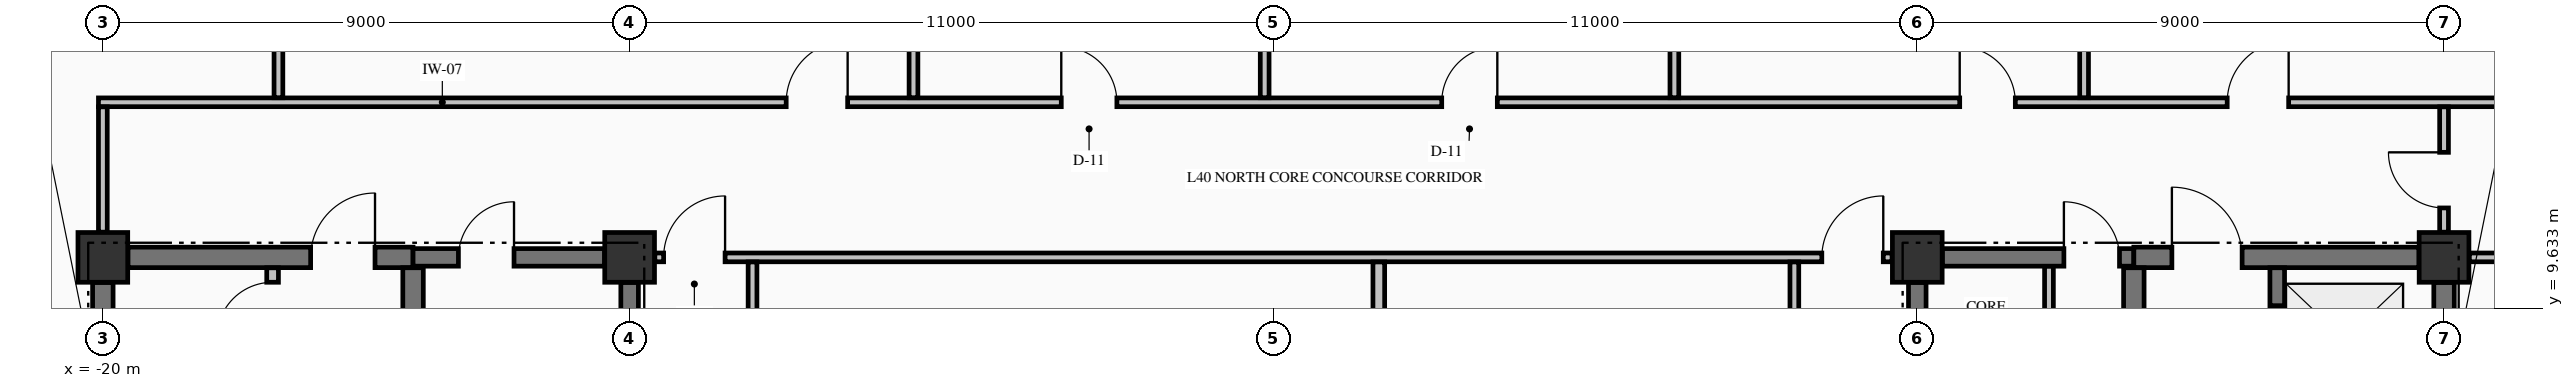
"""IFC4 building model, lengths in metres.
Left out: names, types, materials, properties, quantities, classifications, styles, units other than length and angle.
Written with IfcOpenShell. Run it as: python <this file> out.ifc"""

import sys

from ifc_helpers import new_model, si_unit, direction, frame, frame_2d, origin, origin_2d, place, context, subcontext, project, spatial, rectangle, extrude, element, fill, save


model = new_model("IFC4")
c1 = context("Model", 3, precision=1e-05, world=origin(), true_north=direction((0.0, 1.0)))
c2 = subcontext(c1, "Body", "Model", "MODEL_VIEW")
j1 = project(units=[si_unit("LENGTHUNIT", "METRE"), si_unit("PLANEANGLEUNIT", "RADIAN")], contexts=[c1])
p1 = place(None, origin())
s1 = spatial("IfcSite", under=j1, at=p1, CompositionType="ELEMENT")
p2 = place(p1, origin())
s2 = spatial("IfcBuilding", under=s1, at=p2, CompositionType="ELEMENT")
p3 = place(p2, frame((0.0, 0.0, 158.24)))
s3 = spatial("IfcBuildingStorey", under=s2, at=p3, CompositionType="ELEMENT", Elevation=158.24)
for number, where, z_axis, x_axis in (
    (1, (-20.0, 10.5, -0.425), (0.0, 0.0, 1.0), (1.0, 0.0, 0.0)),
    (2, (-11.0, 10.5, -0.425), (0.0, 0.0, 1.0), (1.0, 0.0, 0.0)),
    (3, (11.0, 10.5, -0.425), (0.0, 0.0, 1.0), (1.0, 0.0, 0.0)),
    (4, (20.0, 10.5, -0.425), (0.0, 0.0, 1.0), (1.0, 0.0, 0.0)),
):
    element("IfcColumn", number, at=place(p3, frame(where, z_axis=z_axis, x_axis=x_axis)), inside=s3, PredefinedType="COLUMN", context=c2, shape_type="SweptSolid", body=[
        extrude(rectangle(XDim=0.85, YDim=0.85, at=origin_2d()), origin(), (0.0, 0.0, 1.0), 4.595),
    ])
p4 = place(p3, frame((-19.571, 10.5, 0.0), z_axis=(0.0, 0.0, 1.0), x_axis=(1.0, 0.0, 0.0)))
e5 = element("IfcWall", 5, at=p4, inside=s3, PredefinedType="SHEAR", context=c2, shape_type="SweptSolid", body=[
    extrude(rectangle(XDim=4.871, YDim=0.35, at=frame_2d((2.436, 0.0))), origin(), (0.0, 0.0, 1.0), 4.17),
])
p5 = place(p4, frame((3.121, 0.0, 0.0)))
e6 = element("IfcOpeningElement", 6, at=p5, cuts=e5, PredefinedType="OPENING", context=c2, shape_type="SweptSolid", body=[
    extrude(rectangle(XDim=1.1, YDim=2.15, at=frame_2d((0.55, 1.075))), frame((0.0, 0.185, 0.0), z_axis=(0.0, -1.0, 0.0), x_axis=(1.0, 0.0, 0.0)), (0.0, 0.0, 1.0), 0.37),
])
p6 = place(p3, frame((-14.7, 10.5, 0.0), z_axis=(0.0, 0.0, 1.0), x_axis=(1.0, 0.0, 0.0)))
e7 = element("IfcWall", 7, at=p6, inside=s3, PredefinedType="SHEAR", context=c2, shape_type="SweptSolid", body=[
    extrude(rectangle(XDim=3.271, YDim=0.3, at=frame_2d((1.635, 0.0))), origin(), (0.0, 0.0, 1.0), 4.17),
])
p7 = place(p6, frame((0.775, 0.0, 0.0)))
e8 = element("IfcOpeningElement", 8, at=p7, cuts=e7, PredefinedType="OPENING", context=c2, shape_type="SweptSolid", body=[
    extrude(rectangle(XDim=0.95, YDim=2.15, at=frame_2d((0.475, 1.075))), frame((0.0, 0.16, 0.0), z_axis=(0.0, -1.0, 0.0), x_axis=(1.0, 0.0, 0.0)), (0.0, 0.0, 1.0), 0.32),
])
p8 = place(p3, frame((11.429, 10.5, 0.0), z_axis=(0.0, 0.0, 1.0), x_axis=(1.0, 0.0, 0.0)))
e9 = element("IfcWall", 9, at=p8, inside=s3, PredefinedType="SHEAR", context=c2, shape_type="SweptSolid", body=[
    extrude(rectangle(XDim=3.271, YDim=0.3, at=frame_2d((1.635, 0.0))), origin(), (0.0, 0.0, 1.0), 4.17),
])
p9 = place(p8, frame((2.076, 0.0, 0.0)))
e10 = element("IfcOpeningElement", 10, at=p9, cuts=e9, PredefinedType="OPENING", context=c2, shape_type="SweptSolid", body=[
    extrude(rectangle(XDim=0.95, YDim=2.15, at=frame_2d((0.475, 1.075))), frame((0.0, 0.16, 0.0), z_axis=(0.0, -1.0, 0.0), x_axis=(1.0, 0.0, 0.0)), (0.0, 0.0, 1.0), 0.32),
])
p10 = place(p3, frame((14.7, 10.5, 0.0), z_axis=(0.0, 0.0, 1.0), x_axis=(1.0, 0.0, 0.0)))
e11 = element("IfcWall", 11, at=p10, inside=s3, PredefinedType="SHEAR", context=c2, shape_type="SweptSolid", body=[
    extrude(rectangle(XDim=4.871, YDim=0.35, at=frame_2d((2.436, 0.0))), origin(), (0.0, 0.0, 1.0), 4.17),
])
p11 = place(p10, frame((0.65, 0.0, 0.0)))
e12 = element("IfcOpeningElement", 12, at=p11, cuts=e11, PredefinedType="OPENING", context=c2, shape_type="SweptSolid", body=[
    extrude(rectangle(XDim=1.2, YDim=2.15, at=frame_2d((0.6, 1.075))), frame((0.0, 0.185, 0.0), z_axis=(0.0, -1.0, 0.0), x_axis=(1.0, 0.0, 0.0)), (0.0, 0.0, 1.0), 0.37),
])
p12 = place(p3, frame((-10.569, 10.5, 0.0), z_axis=(0.0, 0.0, 1.0), x_axis=(1.0, 0.0, 0.0)))
e13 = element("IfcWall", 13, at=p12, inside=s3, PredefinedType="PARTITIONING", context=c2, shape_type="SweptSolid", body=[
    extrude(rectangle(XDim=21.138, YDim=0.15, at=frame_2d((10.569, 0.0))), origin(), (0.0, 0.0, 1.0), 4.17),
])
p13 = place(p12, frame((0.15, 0.0, 0.0)))
e14 = element("IfcOpeningElement", 14, at=p13, cuts=e13, PredefinedType="OPENING", context=c2, shape_type="SweptSolid", body=[
    extrude(rectangle(XDim=1.05, YDim=2.15, at=frame_2d((0.525, 1.075))), frame((0.0, 0.085, 0.0), z_axis=(0.0, -1.0, 0.0), x_axis=(1.0, 0.0, 0.0)), (0.0, 0.0, 1.0), 0.17),
])
p14 = place(p12, frame((19.938, 0.0, 0.0)))
e15 = element("IfcOpeningElement", 15, at=p14, cuts=e13, PredefinedType="OPENING", context=c2, shape_type="SweptSolid", body=[
    extrude(rectangle(XDim=1.05, YDim=2.15, at=frame_2d((0.525, 1.075))), frame((0.0, 0.085, 0.0), z_axis=(0.0, -1.0, 0.0), x_axis=(1.0, 0.0, 0.0)), (0.0, 0.0, 1.0), 0.17),
])
p15 = place(p3, frame((20.431, 10.5, 0.0), z_axis=(0.0, 0.0, 1.0), x_axis=(1.0, 0.0, 0.0)))
e16 = element("IfcWall", 16, at=p15, inside=s3, PredefinedType="PARTITIONING", context=c2, shape_type="SweptSolid", body=[
    extrude(rectangle(XDim=6.404, YDim=0.15, at=frame_2d((3.202, 0.0))), origin(), (0.0, 0.0, 1.0), 4.17),
])
p16 = place(p15, frame((2.594, 0.0, 0.0)))
e17 = element("IfcOpeningElement", 17, at=p16, cuts=e16, PredefinedType="OPENING", context=c2, shape_type="SweptSolid", body=[
    extrude(rectangle(XDim=0.95, YDim=2.15, at=frame_2d((0.475, 1.075))), frame((0.0, 0.085, 0.0), z_axis=(0.0, -1.0, 0.0), x_axis=(1.0, 0.0, 0.0)), (0.0, 0.0, 1.0), 0.17),
])
p17 = place(p3, frame((-20.075, 13.15, 0.0), z_axis=(0.0, 0.0, 1.0), x_axis=(1.0, 0.0, 0.0)))
e18 = element("IfcWall", 18, at=p17, inside=s3, PredefinedType="PARTITIONING", context=c2, shape_type="SweptSolid", body=[
    extrude(rectangle(XDim=46.91, YDim=0.15, at=frame_2d((23.455, 0.0))), origin(), (0.0, 0.0, 1.0), 4.17),
])
p18 = place(p17, frame((11.75, 0.0, 0.0)))
e19 = element("IfcOpeningElement", 19, at=p18, cuts=e18, PredefinedType="OPENING", context=c2, shape_type="SweptSolid", body=[
    extrude(rectangle(XDim=1.05, YDim=2.15, at=frame_2d((0.525, 1.075))), frame((0.0, 0.085, 0.0), z_axis=(0.0, -1.0, 0.0), x_axis=(1.0, 0.0, 0.0)), (0.0, 0.0, 1.0), 0.17),
])
p19 = place(p17, frame((16.45, 0.0, 0.0)))
e20 = element("IfcOpeningElement", 20, at=p19, cuts=e18, PredefinedType="OPENING", context=c2, shape_type="SweptSolid", body=[
    extrude(rectangle(XDim=0.95, YDim=2.15, at=frame_2d((0.475, 1.075))), frame((0.0, 0.085, 0.0), z_axis=(0.0, -1.0, 0.0), x_axis=(1.0, 0.0, 0.0)), (0.0, 0.0, 1.0), 0.17),
])
p20 = place(p17, frame((22.95, 0.0, 0.0)))
e21 = element("IfcOpeningElement", 21, at=p20, cuts=e18, PredefinedType="OPENING", context=c2, shape_type="SweptSolid", body=[
    extrude(rectangle(XDim=0.95, YDim=2.15, at=frame_2d((0.475, 1.075))), frame((0.0, 0.085, 0.0), z_axis=(0.0, -1.0, 0.0), x_axis=(1.0, 0.0, 0.0)), (0.0, 0.0, 1.0), 0.17),
])
p21 = place(p17, frame((31.8, 0.0, 0.0)))
e22 = element("IfcOpeningElement", 22, at=p21, cuts=e18, PredefinedType="OPENING", context=c2, shape_type="SweptSolid", body=[
    extrude(rectangle(XDim=0.95, YDim=2.15, at=frame_2d((0.475, 1.075))), frame((0.0, 0.085, 0.0), z_axis=(0.0, -1.0, 0.0), x_axis=(1.0, 0.0, 0.0)), (0.0, 0.0, 1.0), 0.17),
])
p22 = place(p17, frame((36.37, 0.0, 0.0)))
e23 = element("IfcOpeningElement", 23, at=p22, cuts=e18, PredefinedType="OPENING", context=c2, shape_type="SweptSolid", body=[
    extrude(rectangle(XDim=1.05, YDim=2.15, at=frame_2d((0.525, 1.075))), frame((0.0, 0.085, 0.0), z_axis=(0.0, -1.0, 0.0), x_axis=(1.0, 0.0, 0.0)), (0.0, 0.0, 1.0), 0.17),
])
p23 = place(p3, frame((-20.0, 5.327, 0.0), z_axis=(0.0, 0.0, 1.0), x_axis=(0.0, 1.0, 0.0)))
e24 = element("IfcWall", 24, at=p23, inside=s3, PredefinedType="SHEAR", context=c2, shape_type="SweptSolid", body=[
    extrude(rectangle(XDim=4.744, YDim=0.35, at=frame_2d((2.372, 0.0))), origin(), (0.0, 0.0, 1.0), 4.17),
])
p24 = place(p3, frame((-14.7, 5.852, 0.0), z_axis=(0.0, 0.0, 1.0), x_axis=(0.0, 1.0, 0.0)))
e25 = element("IfcWall", 25, at=p24, inside=s3, PredefinedType="SHEAR", context=c2, shape_type="SweptSolid", body=[
    extrude(rectangle(XDim=4.471, YDim=0.35, at=frame_2d((2.235, 0.0))), origin(), (0.0, 0.0, 1.0), 4.17),
])
for number, where, z_axis, x_axis in (
    (26, (-11.0, 5.852, 0.0), (0.0, 0.0, 1.0), (0.0, 1.0, 0.0)),
    (27, (11.0, 5.852, 0.0), (0.0, 0.0, 1.0), (0.0, 1.0, 0.0)),
):
    element("IfcWall", number, at=place(p3, frame(where, z_axis=z_axis, x_axis=x_axis)), inside=s3, PredefinedType="SHEAR", context=c2, shape_type="SweptSolid", body=[
        extrude(rectangle(XDim=4.219, YDim=0.3, at=frame_2d((2.109, 0.0))), origin(), (0.0, 0.0, 1.0), 4.17),
    ])
p25 = place(p3, frame((14.7, 5.852, 0.0), z_axis=(0.0, 0.0, 1.0), x_axis=(0.0, 1.0, 0.0)))
e28 = element("IfcWall", 28, at=p25, inside=s3, PredefinedType="SHEAR", context=c2, shape_type="SweptSolid", body=[
    extrude(rectangle(XDim=4.471, YDim=0.35, at=frame_2d((2.235, 0.0))), origin(), (0.0, 0.0, 1.0), 4.17),
])
p26 = place(p3, frame((17.15, 7.877, 0.0), z_axis=(0.0, 0.0, 1.0), x_axis=(0.0, 1.0, 0.0)))
e29 = element("IfcWall", 29, at=p26, inside=s3, PredefinedType="SOLIDWALL", context=c2, shape_type="SweptSolid", body=[
    extrude(rectangle(XDim=2.446, YDim=0.25, at=frame_2d((1.223, 0.0))), origin(), (0.0, 0.0, 1.0), 4.17),
])
p27 = place(p26, frame((0.698, 0.0, 0.0)))
e30 = element("IfcOpeningElement", 30, at=p27, cuts=e29, PredefinedType="OPENING", context=c2, shape_type="SweptSolid", body=[
    extrude(rectangle(XDim=1.1, YDim=2.2, at=frame_2d((0.55, 1.1))), frame((0.0, 0.135, 0.0), z_axis=(0.0, -1.0, 0.0), x_axis=(1.0, 0.0, 0.0)), (0.0, 0.0, 1.0), 0.27),
])
p28 = place(p3, frame((20.0, 7.877, 0.0), z_axis=(0.0, 0.0, 1.0), x_axis=(0.0, 1.0, 0.0)))
e31 = element("IfcWall", 31, at=p28, inside=s3, PredefinedType="SHEAR", context=c2, shape_type="SweptSolid", body=[
    extrude(rectangle(XDim=2.194, YDim=0.35, at=frame_2d((1.097, 0.0))), origin(), (0.0, 0.0, 1.0), 4.17),
])
p29 = place(p3, frame((-20.0, 10.931, 0.0), z_axis=(0.0, 0.0, 1.0), x_axis=(0.0, 1.0, 0.0)))
e32 = element("IfcWall", 32, at=p29, inside=s3, PredefinedType="PARTITIONING", context=c2, shape_type="SweptSolid", body=[
    extrude(rectangle(XDim=2.141, YDim=0.15, at=frame_2d((1.071, 0.0))), origin(), (0.0, 0.0, 1.0), 3.36),
])
p30 = place(p3, frame((-17.1, 8.778, 0.0), z_axis=(0.0, 0.0, 1.0), x_axis=(0.0, 1.0, 0.0)))
e33 = element("IfcWall", 33, at=p30, inside=s3, PredefinedType="PARTITIONING", context=c2, shape_type="SweptSolid", body=[
    extrude(rectangle(XDim=1.544, YDim=0.2, at=frame_2d((0.772, 0.0))), origin(), (0.0, 0.0, 1.0), 4.17),
])
p31 = place(p30, frame((0.347, 0.0, 0.0)))
e34 = element("IfcOpeningElement", 34, at=p31, cuts=e33, PredefinedType="OPENING", context=c2, shape_type="SweptSolid", body=[
    extrude(rectangle(XDim=0.95, YDim=2.15, at=frame_2d((0.475, 1.075))), frame((0.0, 0.11, 0.0), z_axis=(0.0, -1.0, 0.0), x_axis=(1.0, 0.0, 0.0)), (0.0, 0.0, 1.0), 0.22),
])
p32 = place(p3, frame((-17.0, 13.228, 0.0), z_axis=(0.0, 0.0, 1.0), x_axis=(0.0, 1.0, 0.0)))
e35 = element("IfcWall", 35, at=p32, inside=s3, PredefinedType="PARTITIONING", context=c2, shape_type="SweptSolid", body=[
    extrude(rectangle(XDim=5.766, YDim=0.15, at=frame_2d((2.883, 0.0))), origin(), (0.0, 0.0, 1.0), 4.17),
])
p33 = place(p3, frame((-8.9, -3.897, 0.0), z_axis=(0.0, 0.0, 1.0), x_axis=(0.0, 1.0, 0.0)))
e36 = element("IfcWall", 36, at=p33, inside=s3, PredefinedType="PARTITIONING", context=c2, shape_type="SweptSolid", body=[
    extrude(rectangle(XDim=14.319, YDim=0.15, at=frame_2d((7.16, 0.0))), origin(), (0.0, 0.0, 1.0), 4.17),
])
p34 = place(p33, frame((6.622, 0.0, 0.0)))
e37 = element("IfcOpeningElement", 37, at=p34, cuts=e36, PredefinedType="OPENING", context=c2, shape_type="SweptSolid", body=[
    extrude(rectangle(XDim=1.05, YDim=2.15, at=frame_2d((0.525, 1.075))), frame((0.0, 0.085, 0.0), z_axis=(0.0, -1.0, 0.0), x_axis=(1.0, 0.0, 0.0)), (0.0, 0.0, 1.0), 0.17),
])
p35 = place(p3, frame((-6.15, 13.228, 0.0), z_axis=(0.0, 0.0, 1.0), x_axis=(0.0, 1.0, 0.0)))
e38 = element("IfcWall", 38, at=p35, inside=s3, PredefinedType="PARTITIONING", context=c2, shape_type="SweptSolid", body=[
    extrude(rectangle(XDim=11.107, YDim=0.15, at=frame_2d((5.553, 0.0))), origin(), (0.0, 0.0, 1.0), 4.17),
])
p36 = place(p3, frame((-0.15, 13.228, 0.0), z_axis=(0.0, 0.0, 1.0), x_axis=(0.0, 1.0, 0.0)))
e39 = element("IfcWall", 39, at=p36, inside=s3, PredefinedType="PARTITIONING", context=c2, shape_type="SweptSolid", body=[
    extrude(rectangle(XDim=10.766, YDim=0.15, at=frame_2d((5.383, 0.0))), origin(), (0.0, 0.0, 1.0), 3.185),
])
p37 = place(p3, frame((1.8, 0.303, 0.0), z_axis=(0.0, 0.0, 1.0), x_axis=(0.0, 1.0, 0.0)))
e40 = element("IfcWall", 40, at=p37, inside=s3, PredefinedType="PARTITIONING", context=c2, shape_type="SweptSolid", body=[
    extrude(rectangle(XDim=10.119, YDim=0.2, at=frame_2d((5.06, 0.0))), origin(), (0.0, 0.0, 1.0), 4.17),
])
p38 = place(p3, frame((6.85, 13.228, 0.0), z_axis=(0.0, 0.0, 1.0), x_axis=(0.0, 1.0, 0.0)))
e41 = element("IfcWall", 41, at=p38, inside=s3, PredefinedType="PARTITIONING", context=c2, shape_type="SweptSolid", body=[
    extrude(rectangle(XDim=11.212, YDim=0.15, at=frame_2d((5.606, 0.0))), origin(), (0.0, 0.0, 1.0), 4.17),
])
p39 = place(p3, frame((8.9, 0.303, 0.0), z_axis=(0.0, 0.0, 1.0), x_axis=(0.0, 1.0, 0.0)))
e42 = element("IfcWall", 42, at=p39, inside=s3, PredefinedType="PARTITIONING", context=c2, shape_type="SweptSolid", body=[
    extrude(rectangle(XDim=10.119, YDim=0.15, at=frame_2d((5.06, 0.0))), origin(), (0.0, 0.0, 1.0), 4.17),
])
p40 = place(p39, frame((4.497, 0.0, 0.0)))
e43 = element("IfcOpeningElement", 43, at=p40, cuts=e42, PredefinedType="OPENING", context=c2, shape_type="SweptSolid", body=[
    extrude(rectangle(XDim=1.1, YDim=2.15, at=frame_2d((0.55, 1.075))), frame((0.0, 0.085, 0.0), z_axis=(0.0, -1.0, 0.0), x_axis=(1.0, 0.0, 0.0)), (0.0, 0.0, 1.0), 0.17),
])
p41 = place(p3, frame((13.25, 5.853, 0.0), z_axis=(0.0, 0.0, 1.0), x_axis=(0.0, 1.0, 0.0)))
e44 = element("IfcWall", 44, at=p41, inside=s3, PredefinedType="PARTITIONING", context=c2, shape_type="SweptSolid", body=[
    extrude(rectangle(XDim=4.494, YDim=0.15, at=frame_2d((2.247, 0.0))), origin(), (0.0, 0.0, 1.0), 4.17),
])
p42 = place(p41, frame((1.472, 0.0, 0.0)))
e45 = element("IfcOpeningElement", 45, at=p42, cuts=e44, PredefinedType="OPENING", context=c2, shape_type="SweptSolid", body=[
    extrude(rectangle(XDim=0.95, YDim=2.15, at=frame_2d((0.475, 1.075))), frame((0.0, 0.085, 0.0), z_axis=(0.0, -1.0, 0.0), x_axis=(1.0, 0.0, 0.0)), (0.0, 0.0, 1.0), 0.17),
])
p43 = place(p3, frame((13.85, 13.228, 0.0), z_axis=(0.0, 0.0, 1.0), x_axis=(0.0, 1.0, 0.0)))
e46 = element("IfcWall", 46, at=p43, inside=s3, PredefinedType="PARTITIONING", context=c2, shape_type="SweptSolid", body=[
    extrude(rectangle(XDim=11.107, YDim=0.15, at=frame_2d((5.553, 0.0))), origin(), (0.0, 0.0, 1.0), 4.17),
])
p44 = place(p3, frame((20.0, 10.931, 0.0), z_axis=(0.0, 0.0, 1.0), x_axis=(0.0, 1.0, 0.0)))
e47 = element("IfcWall", 47, at=p44, inside=s3, PredefinedType="PARTITIONING", context=c2, shape_type="SweptSolid", body=[
    extrude(rectangle(XDim=2.141, YDim=0.15, at=frame_2d((1.071, 0.0))), origin(), (0.0, 0.0, 1.0), 3.36),
])
p45 = place(p44, frame((0.414, 0.0, 0.0)))
e48 = element("IfcOpeningElement", 48, at=p45, cuts=e47, PredefinedType="OPENING", context=c2, shape_type="SweptSolid", body=[
    extrude(rectangle(XDim=0.95, YDim=2.15, at=frame_2d((0.475, 1.075))), frame((0.0, 0.085, 0.0), z_axis=(0.0, -1.0, 0.0), x_axis=(1.0, 0.0, 0.0)), (0.0, 0.0, 1.0), 0.17),
])
p46 = place(p7, origin())
e49 = element("IfcDoor", 49, at=p46, inside=s3, OperationType="SINGLE_SWING_RIGHT", PredefinedType="DOOR", context=c2, shape_type="SweptSolid", body=[
    extrude(rectangle(XDim=0.95, YDim=2.15, at=frame_2d((0.475, 1.075))), frame((0.0, 0.025, 0.0), z_axis=(0.0, -1.0, 0.0), x_axis=(1.0, 0.0, 0.0)), (0.0, 0.0, 1.0), 0.05),
])
fill(e8, e49)
p47 = place(p9, origin())
e50 = element("IfcDoor", 50, at=p47, inside=s3, OperationType="SINGLE_SWING_LEFT", PredefinedType="DOOR", context=c2, shape_type="SweptSolid", body=[
    extrude(rectangle(XDim=0.95, YDim=2.15, at=frame_2d((0.475, 1.075))), frame((0.0, 0.025, 0.0), z_axis=(0.0, -1.0, 0.0), x_axis=(1.0, 0.0, 0.0)), (0.0, 0.0, 1.0), 0.05),
])
fill(e10, e50)
p48 = place(p5, origin())
e51 = element("IfcDoor", 51, at=p48, inside=s3, OperationType="SINGLE_SWING_RIGHT", PredefinedType="DOOR", context=c2, shape_type="SweptSolid", body=[
    extrude(rectangle(XDim=1.1, YDim=2.15, at=frame_2d((0.55, 1.075))), frame((0.0, 0.025, 0.0), z_axis=(0.0, -1.0, 0.0), x_axis=(1.0, 0.0, 0.0)), (0.0, 0.0, 1.0), 0.05),
])
fill(e6, e51)
p49 = place(p31, origin())
e52 = element("IfcDoor", 52, at=p49, inside=s3, OperationType="SINGLE_SWING_LEFT", PredefinedType="DOOR", context=c2, shape_type="SweptSolid", body=[
    extrude(rectangle(XDim=0.95, YDim=2.15, at=frame_2d((0.475, 1.075))), frame((0.0, 0.025, 0.0), z_axis=(0.0, -1.0, 0.0), x_axis=(1.0, 0.0, 0.0)), (0.0, 0.0, 1.0), 0.05),
])
fill(e34, e52)
p50 = place(p27, origin())
e53 = element("IfcDoor", 53, at=p50, inside=s3, OperationType="SLIDING_TO_RIGHT", PredefinedType="DOOR", context=c2, shape_type="SweptSolid", body=[
    extrude(rectangle(XDim=1.1, YDim=2.2, at=frame_2d((0.55, 1.1))), frame((0.0, 0.025, 0.0), z_axis=(0.0, -1.0, 0.0), x_axis=(1.0, 0.0, 0.0)), (0.0, 0.0, 1.0), 0.05),
])
fill(e30, e53)
p51 = place(p11, origin())
e54 = element("IfcDoor", 54, at=p51, inside=s3, OperationType="SINGLE_SWING_LEFT", PredefinedType="DOOR", context=c2, shape_type="SweptSolid", body=[
    extrude(rectangle(XDim=1.2, YDim=2.15, at=frame_2d((0.6, 1.075))), frame((0.0, 0.025, 0.0), z_axis=(0.0, -1.0, 0.0), x_axis=(1.0, 0.0, 0.0)), (0.0, 0.0, 1.0), 0.05),
])
fill(e12, e54)
p52 = place(p13, origin())
e55 = element("IfcDoor", 55, at=p52, inside=s3, OperationType="SINGLE_SWING_RIGHT", PredefinedType="DOOR", context=c2, shape_type="SweptSolid", body=[
    extrude(rectangle(XDim=1.05, YDim=2.15, at=frame_2d((0.525, 1.075))), frame((0.0, 0.025, 0.0), z_axis=(0.0, -1.0, 0.0), x_axis=(1.0, 0.0, 0.0)), (0.0, 0.0, 1.0), 0.05),
])
fill(e14, e55)
p53 = place(p14, origin())
e56 = element("IfcDoor", 56, at=p53, inside=s3, OperationType="SINGLE_SWING_RIGHT", PredefinedType="DOOR", context=c2, shape_type="SweptSolid", body=[
    extrude(rectangle(XDim=1.05, YDim=2.15, at=frame_2d((0.525, 1.075))), frame((0.0, 0.025, 0.0), z_axis=(0.0, -1.0, 0.0), x_axis=(1.0, 0.0, 0.0)), (0.0, 0.0, 1.0), 0.05),
])
fill(e15, e56)
p54 = place(p18, origin())
e57 = element("IfcDoor", 57, at=p54, inside=s3, OperationType="SINGLE_SWING_RIGHT", PredefinedType="DOOR", context=c2, shape_type="SweptSolid", body=[
    extrude(rectangle(XDim=1.05, YDim=2.15, at=frame_2d((0.525, 1.075))), frame((0.0, 0.025, 0.0), z_axis=(0.0, -1.0, 0.0), x_axis=(1.0, 0.0, 0.0)), (0.0, 0.0, 1.0), 0.05),
])
fill(e19, e57)
p55 = place(p19, origin())
e58 = element("IfcDoor", 58, at=p55, inside=s3, OperationType="SINGLE_SWING_LEFT", PredefinedType="DOOR", context=c2, shape_type="SweptSolid", body=[
    extrude(rectangle(XDim=0.95, YDim=2.15, at=frame_2d((0.475, 1.075))), frame((0.0, 0.025, 0.0), z_axis=(0.0, -1.0, 0.0), x_axis=(1.0, 0.0, 0.0)), (0.0, 0.0, 1.0), 0.05),
])
fill(e20, e58)
p56 = place(p20, origin())
e59 = element("IfcDoor", 59, at=p56, inside=s3, OperationType="SINGLE_SWING_RIGHT", PredefinedType="DOOR", context=c2, shape_type="SweptSolid", body=[
    extrude(rectangle(XDim=0.95, YDim=2.15, at=frame_2d((0.475, 1.075))), frame((0.0, 0.025, 0.0), z_axis=(0.0, -1.0, 0.0), x_axis=(1.0, 0.0, 0.0)), (0.0, 0.0, 1.0), 0.05),
])
fill(e21, e59)
p57 = place(p21, origin())
e60 = element("IfcDoor", 60, at=p57, inside=s3, OperationType="SINGLE_SWING_LEFT", PredefinedType="DOOR", context=c2, shape_type="SweptSolid", body=[
    extrude(rectangle(XDim=0.95, YDim=2.15, at=frame_2d((0.475, 1.075))), frame((0.0, 0.025, 0.0), z_axis=(0.0, -1.0, 0.0), x_axis=(1.0, 0.0, 0.0)), (0.0, 0.0, 1.0), 0.05),
])
fill(e22, e60)
p58 = place(p22, origin())
e61 = element("IfcDoor", 61, at=p58, inside=s3, OperationType="SINGLE_SWING_RIGHT", PredefinedType="DOOR", context=c2, shape_type="SweptSolid", body=[
    extrude(rectangle(XDim=1.05, YDim=2.15, at=frame_2d((0.525, 1.075))), frame((0.0, 0.025, 0.0), z_axis=(0.0, -1.0, 0.0), x_axis=(1.0, 0.0, 0.0)), (0.0, 0.0, 1.0), 0.05),
])
fill(e23, e61)
p59 = place(p45, origin())
e62 = element("IfcDoor", 62, at=p59, inside=s3, OperationType="SINGLE_SWING_RIGHT", PredefinedType="DOOR", context=c2, shape_type="SweptSolid", body=[
    extrude(rectangle(XDim=0.95, YDim=2.15, at=frame_2d((0.475, 1.075))), frame((0.0, 0.025, 0.0), z_axis=(0.0, -1.0, 0.0), x_axis=(1.0, 0.0, 0.0)), (0.0, 0.0, 1.0), 0.05),
])
fill(e48, e62)
save(model, sys.argv[1])
